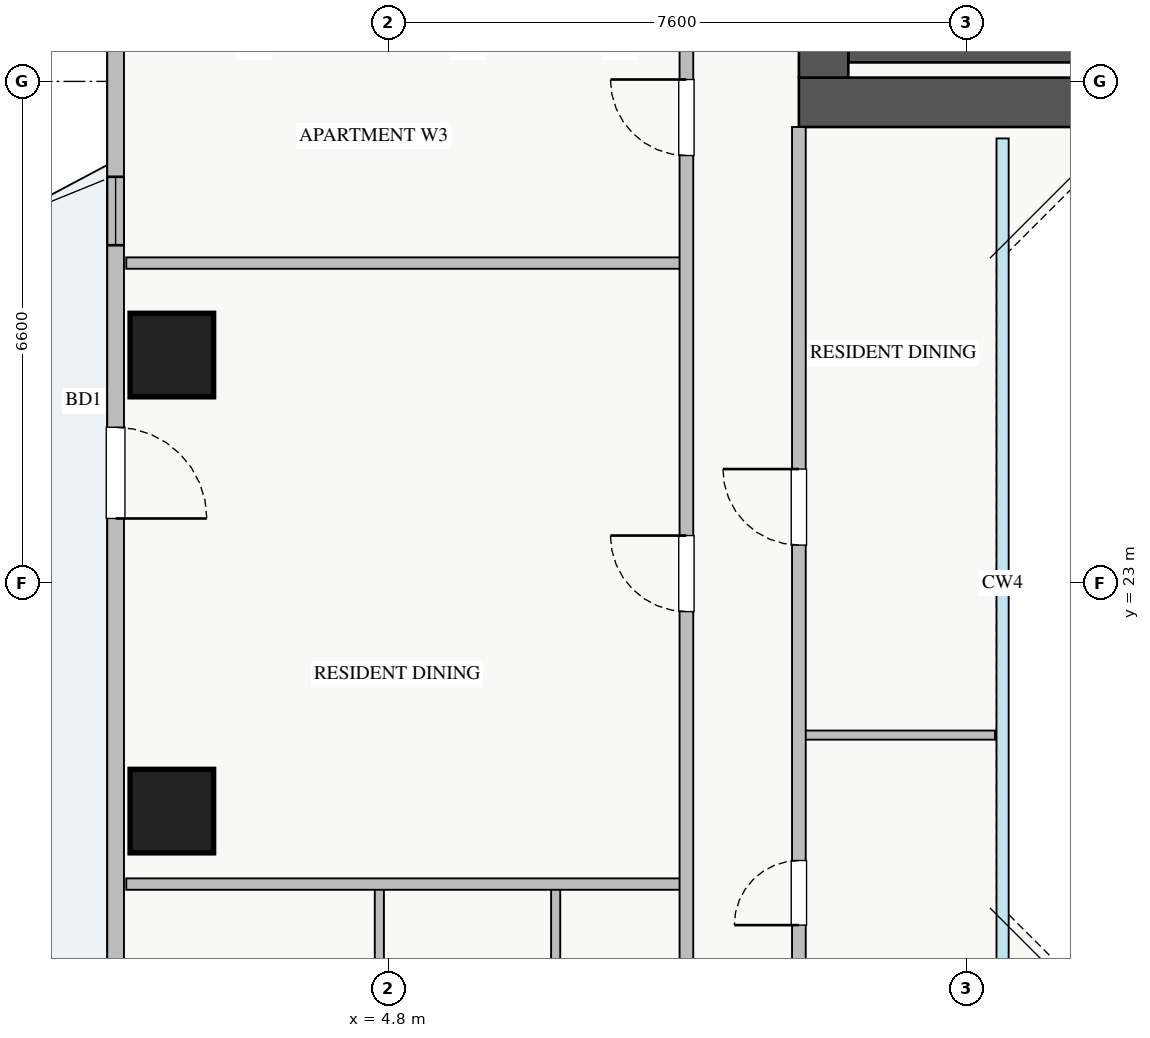
"""IFC4 building model, lengths in metres.
Left out: names, types, materials, properties, quantities, classifications, styles, units other than length and angle.
Written with IfcOpenShell. Run it as: python <this file> out.ifc"""

import sys

from ifc_helpers import new_model, si_unit, direction, frame, frame_2d, origin, origin_2d, place, context, subcontext, project, spatial, rectangle, extrude, source, transform, mapped, element, fill, save


model = new_model("IFC4")
c1 = context("Model", 3, precision=1e-05, world=origin(), true_north=direction((0.0, 1.0)))
c2 = subcontext(c1, "Body", "Model", "MODEL_VIEW")
j1 = project(units=[si_unit("LENGTHUNIT", "METRE"), si_unit("PLANEANGLEUNIT", "RADIAN")], contexts=[c1])
p1 = place(None, origin())
s1 = spatial("IfcSite", under=j1, at=p1, CompositionType="ELEMENT")
p2 = place(p1, origin())
s2 = spatial("IfcBuilding", under=s1, at=p2, CompositionType="ELEMENT")
p3 = place(p2, frame((0.0, 0.0, 123.0)))
s3 = spatial("IfcBuildingStorey", under=s2, at=p3, CompositionType="ELEMENT", Elevation=123.0)
p4 = place(p3, frame((10.85, 29.95, 0.0), z_axis=(0.0, 0.0, 1.0), x_axis=(1.0, 0.0, 0.0)))
e1 = element("IfcWall", 1, at=p4, inside=s3, PredefinedType="SHEAR", context=c2, shape_type="SweptSolid", body=[
    extrude(rectangle(XDim=7.3, YDim=0.2, at=frame_2d((3.65, 0.0))), origin(), (0.0, 0.0, 1.0), 3.25),
])
p5 = place(p3, frame((10.2, 29.325, 0.0), z_axis=(0.0, 0.0, 1.0), x_axis=(1.0, 0.0, 0.0)))
e2 = element("IfcWall", 2, at=p5, inside=s3, PredefinedType="SHEAR", context=c2, shape_type="SweptSolid", body=[
    extrude(rectangle(XDim=17.6, YDim=0.65, at=frame_2d((8.8, 0.0))), origin(), (0.0, 0.0, 1.0), 3.25),
])
p6 = place(p3, frame((10.525, 29.65, 0.0), z_axis=(0.0, 0.0, 1.0), x_axis=(0.0, 1.0, 0.0)))
e3 = element("IfcWall", 3, at=p6, inside=s3, PredefinedType="SHEAR", context=c2, shape_type="SweptSolid", body=[
    extrude(rectangle(XDim=5.9, YDim=0.65, at=frame_2d((2.95, 0.0))), origin(), (0.0, 0.0, 1.0), 3.25),
])
m1 = source(origin(), c2, "Body", "SweptSolid", [
    extrude(rectangle(XDim=1.1, YDim=1.1, at=origin_2d()), origin(), (0.0, 0.0, 1.0), 3.25),
])
for number, where, z_axis, x_axis in (
    (4, (1.95, 26.0, 0.0), (0.0, 0.0, 1.0), (1.0, 0.0, 0.0)),
    (5, (1.95, 20.0, 0.0), (0.0, 0.0, 1.0), (1.0, 0.0, 0.0)),
):
    element("IfcColumn", number, at=place(p3, frame(where, z_axis=z_axis, x_axis=x_axis)), inside=s3, PredefinedType="COLUMN", context=c2, shape_type="MappedRepresentation", body=[
        mapped(m1, transform((0.0, 0.0, 0.0), x_axis=(1.0, 0.0, 0.0), y_axis=(0.0, 1.0, 0.0), z_axis=(0.0, 0.0, 1.0), scale=1.0)),
    ])
p7 = place(p3, frame((1.21, 10.55, 0.0), z_axis=(0.0, 0.0, 1.0), x_axis=(0.0, 1.0, 0.0)))
e6 = element("IfcWall", 6, at=p7, inside=s3, PredefinedType="STANDARD", context=c2, shape_type="SweptSolid", body=[
    extrude(rectangle(XDim=24.9, YDim=0.22, at=frame_2d((12.45, 0.0))), origin(), (0.0, 0.0, 1.0), 2.61),
])
p8 = place(p7, frame((13.3, 0.0, 0.0)))
e7 = element("IfcOpeningElement", 7, at=p8, cuts=e6, PredefinedType="OPENING", context=c2, shape_type="SweptSolid", body=[
    extrude(rectangle(XDim=1.2, YDim=2.1, at=frame_2d((0.6, 1.05))), frame((0.0, 0.12, 0.0), z_axis=(0.0, -1.0, 0.0), x_axis=(1.0, 0.0, 0.0)), (0.0, 0.0, 1.0), 0.24),
])
p9 = place(p7, frame((0.625, 0.0, 0.9)))
e8 = element("IfcOpeningElement", 8, at=p9, cuts=e6, PredefinedType="OPENING", context=c2, shape_type="SweptSolid", body=[
    extrude(rectangle(XDim=2.4, YDim=1.5, at=frame_2d((1.2, 0.75))), frame((0.0, 0.12, 0.0), z_axis=(0.0, -1.0, 0.0), x_axis=(1.0, 0.0, 0.0)), (0.0, 0.0, 1.0), 0.24),
])
p10 = place(p7, frame((21.82, 0.0, 0.9)))
e9 = element("IfcOpeningElement", 9, at=p10, cuts=e6, PredefinedType="OPENING", context=c2, shape_type="SweptSolid", body=[
    extrude(rectangle(XDim=2.1, YDim=1.5, at=frame_2d((1.05, 0.75))), frame((0.0, 0.12, 0.0), z_axis=(0.0, -1.0, 0.0), x_axis=(1.0, 0.0, 0.0)), (0.0, 0.0, 1.0), 0.24),
])
p11 = place(p7, frame((4.847, 0.0, 0.9)))
e10 = element("IfcOpeningElement", 10, at=p11, cuts=e6, PredefinedType="OPENING", context=c2, shape_type="SweptSolid", body=[
    extrude(rectangle(XDim=2.4, YDim=1.5, at=frame_2d((1.2, 0.75))), frame((0.0, 0.12, 0.0), z_axis=(0.0, -1.0, 0.0), x_axis=(1.0, 0.0, 0.0)), (0.0, 0.0, 1.0), 0.24),
])
p12 = place(p7, frame((16.895, 0.0, 0.9)))
e11 = element("IfcOpeningElement", 11, at=p12, cuts=e6, PredefinedType="OPENING", context=c2, shape_type="SweptSolid", body=[
    extrude(rectangle(XDim=0.9, YDim=1.2, at=frame_2d((0.45, 0.6))), frame((0.0, 0.12, 0.0), z_axis=(0.0, -1.0, 0.0), x_axis=(1.0, 0.0, 0.0)), (0.0, 0.0, 1.0), 0.24),
])
for number, where, z_axis, x_axis in (
    (12, (4.68, 14.17, 0.0), (0.0, 0.0, 1.0), (0.0, 1.0, 0.0)),
    (13, (7.0, 14.17, 0.0), (0.0, 0.0, 1.0), (0.0, 1.0, 0.0)),
):
    element("IfcWall", number, at=place(p3, frame(where, z_axis=z_axis, x_axis=x_axis)), inside=s3, PredefinedType="PLUMBINGWALL", context=c2, shape_type="SweptSolid", body=[
        extrude(rectangle(XDim=4.87, YDim=0.12, at=frame_2d((2.435, 0.0))), origin(), (0.0, 0.0, 1.0), 3.07),
    ])
for number, where, z_axis, x_axis in (
    (14, (1.35, 19.04, 0.0), (0.0, 0.0, 1.0), (1.0, 0.0, 0.0)),
    (15, (1.35, 27.21, 0.0), (0.0, 0.0, 1.0), (1.0, 0.0, 0.0)),
):
    element("IfcWall", number, at=place(p3, frame(where, z_axis=z_axis, x_axis=x_axis)), inside=s3, PredefinedType="PARTITIONING", context=c2, shape_type="SweptSolid", body=[
        extrude(rectangle(XDim=7.37, YDim=0.15, at=frame_2d((3.685, 0.0))), origin(), (0.0, 0.0, 1.0), 3.07),
    ])
p13 = place(p3, frame((8.72, 8.31, 0.0), z_axis=(0.0, 0.0, 1.0), x_axis=(0.0, 1.0, 0.0)))
e16 = element("IfcWall", 16, at=p13, inside=s3, PredefinedType="PARTITIONING", context=c2, shape_type="SweptSolid", body=[
    extrude(rectangle(XDim=29.37, YDim=0.18, at=frame_2d((14.685, 0.0))), origin(), (0.0, 0.0, 1.0), 3.07),
])
p14 = place(p13, frame((28.06, 0.0, 0.0)))
e17 = element("IfcOpeningElement", 17, at=p14, cuts=e16, PredefinedType="OPENING", context=c2, shape_type="SweptSolid", body=[
    extrude(rectangle(XDim=0.9, YDim=2.05, at=frame_2d((0.45, 1.025))), frame((0.0, 0.1, 0.0), z_axis=(0.0, -1.0, 0.0), x_axis=(1.0, 0.0, 0.0)), (0.0, 0.0, 1.0), 0.2),
])
p15 = place(p13, frame((0.24, 0.0, 0.0)))
e18 = element("IfcOpeningElement", 18, at=p15, cuts=e16, PredefinedType="OPENING", context=c2, shape_type="SweptSolid", body=[
    extrude(rectangle(XDim=0.9, YDim=2.05, at=frame_2d((0.45, 1.025))), frame((0.0, 0.1, 0.0), z_axis=(0.0, -1.0, 0.0), x_axis=(1.0, 0.0, 0.0)), (0.0, 0.0, 1.0), 0.2),
])
p16 = place(p13, frame((2.92, 0.0, 0.0)))
e19 = element("IfcOpeningElement", 19, at=p16, cuts=e16, PredefinedType="OPENING", context=c2, shape_type="SweptSolid", body=[
    extrude(rectangle(XDim=1.0, YDim=2.05, at=frame_2d((0.5, 1.025))), frame((0.0, 0.1, 0.0), z_axis=(0.0, -1.0, 0.0), x_axis=(1.0, 0.0, 0.0)), (0.0, 0.0, 1.0), 0.2),
])
p17 = place(p13, frame((14.315, 0.0, 0.0)))
e20 = element("IfcOpeningElement", 20, at=p17, cuts=e16, PredefinedType="OPENING", context=c2, shape_type="SweptSolid", body=[
    extrude(rectangle(XDim=1.0, YDim=2.05, at=frame_2d((0.5, 1.025))), frame((0.0, 0.1, 0.0), z_axis=(0.0, -1.0, 0.0), x_axis=(1.0, 0.0, 0.0)), (0.0, 0.0, 1.0), 0.2),
])
p18 = place(p13, frame((20.315, 0.0, 0.0)))
e21 = element("IfcOpeningElement", 21, at=p18, cuts=e16, PredefinedType="OPENING", context=c2, shape_type="SweptSolid", body=[
    extrude(rectangle(XDim=1.0, YDim=2.05, at=frame_2d((0.5, 1.025))), frame((0.0, 0.1, 0.0), z_axis=(0.0, -1.0, 0.0), x_axis=(1.0, 0.0, 0.0)), (0.0, 0.0, 1.0), 0.2),
])
p19 = place(p3, frame((10.2, 21.0, 0.0), z_axis=(0.0, 0.0, 1.0), x_axis=(1.0, 0.0, 0.0)))
e22 = element("IfcWall", 22, at=p19, inside=s3, PredefinedType="PLUMBINGWALL", context=c2, shape_type="SweptSolid", body=[
    extrude(rectangle(XDim=2.58, YDim=0.12, at=frame_2d((1.29, 0.0))), origin(), (0.0, 0.0, 1.0), 3.07),
])
p20 = place(p3, frame((10.2, 17.0, 0.0), z_axis=(0.0, 0.0, 1.0), x_axis=(0.0, 1.0, 0.0)))
e23 = element("IfcWall", 23, at=p20, inside=s3, PredefinedType="PARTITIONING", context=c2, shape_type="SweptSolid", body=[
    extrude(rectangle(XDim=12.0, YDim=0.18, at=frame_2d((6.0, 0.0))), origin(), (0.0, 0.0, 1.0), 3.07),
])
p21 = place(p20, frame((1.5, 0.0, 0.0)))
e24 = element("IfcOpeningElement", 24, at=p21, cuts=e23, PredefinedType="OPENING", context=c2, shape_type="SweptSolid", body=[
    extrude(rectangle(XDim=0.85, YDim=2.05, at=frame_2d((0.425, 1.025))), frame((0.0, 0.1, 0.0), z_axis=(0.0, -1.0, 0.0), x_axis=(1.0, 0.0, 0.0)), (0.0, 0.0, 1.0), 0.2),
])
p22 = place(p20, frame((6.5, 0.0, 0.0)))
e25 = element("IfcOpeningElement", 25, at=p22, cuts=e23, PredefinedType="OPENING", context=c2, shape_type="SweptSolid", body=[
    extrude(rectangle(XDim=1.0, YDim=2.05, at=frame_2d((0.5, 1.025))), frame((0.0, 0.1, 0.0), z_axis=(0.0, -1.0, 0.0), x_axis=(1.0, 0.0, 0.0)), (0.0, 0.0, 1.0), 0.2),
])
m2 = source(origin(), c2, "Body", "SweptSolid", [
    extrude(rectangle(XDim=1.2, YDim=2.1, at=frame_2d((0.6, 1.05))), frame((0.0, 0.025, 0.0), z_axis=(0.0, -1.0, 0.0), x_axis=(1.0, 0.0, 0.0)), (0.0, 0.0, 1.0), 0.05),
])
p23 = place(p8, frame((1.2, 0.0, 0.0), z_axis=(0.0, 0.0, 1.0), x_axis=(-1.0, 0.0, 0.0)))
e26 = element("IfcDoor", 26, at=p23, inside=s3, OperationType="SINGLE_SWING_LEFT", PredefinedType="DOOR", context=c2, shape_type="MappedRepresentation", body=[
    mapped(m2, transform((0.0, 0.0, 0.0), x_axis=(1.0, 0.0, 0.0), y_axis=(0.0, 1.0, 0.0), z_axis=(0.0, 0.0, 1.0), scale=1.0)),
])
fill(e7, e26)
m3 = source(origin(), c2, "Body", "SweptSolid", [
    extrude(rectangle(XDim=1.0, YDim=2.05, at=frame_2d((0.5, 1.025))), frame((0.0, 0.025, 0.0), z_axis=(0.0, -1.0, 0.0), x_axis=(1.0, 0.0, 0.0)), (0.0, 0.0, 1.0), 0.05),
])
p24 = place(p17, origin())
e27 = element("IfcDoor", 27, at=p24, inside=s3, OperationType="SINGLE_SWING_RIGHT", PredefinedType="DOOR", context=c2, shape_type="MappedRepresentation", body=[
    mapped(m3, transform((0.0, 0.0, 0.0), x_axis=(1.0, 0.0, 0.0), y_axis=(0.0, 1.0, 0.0), z_axis=(0.0, 0.0, 1.0), scale=1.0)),
])
fill(e20, e27)
p25 = place(p18, origin())
e28 = element("IfcDoor", 28, at=p25, inside=s3, OperationType="SINGLE_SWING_RIGHT", PredefinedType="DOOR", context=c2, shape_type="MappedRepresentation", body=[
    mapped(m3, transform((0.0, 0.0, 0.0), x_axis=(1.0, 0.0, 0.0), y_axis=(0.0, 1.0, 0.0), z_axis=(0.0, 0.0, 1.0), scale=1.0)),
])
fill(e21, e28)
m4 = source(origin(), c2, "Body", "SweptSolid", [
    extrude(rectangle(XDim=0.85, YDim=2.05, at=frame_2d((0.425, 1.025))), frame((0.0, 0.025, 0.0), z_axis=(0.0, -1.0, 0.0), x_axis=(1.0, 0.0, 0.0)), (0.0, 0.0, 1.0), 0.05),
])
p26 = place(p21, origin())
e29 = element("IfcDoor", 29, at=p26, inside=s3, OperationType="SINGLE_SWING_LEFT", PredefinedType="DOOR", context=c2, shape_type="MappedRepresentation", body=[
    mapped(m4, transform((0.0, 0.0, 0.0), x_axis=(1.0, 0.0, 0.0), y_axis=(0.0, 1.0, 0.0), z_axis=(0.0, 0.0, 1.0), scale=1.0)),
])
fill(e24, e29)
p27 = place(p22, origin())
e30 = element("IfcDoor", 30, at=p27, inside=s3, OperationType="SINGLE_SWING_RIGHT", PredefinedType="DOOR", context=c2, shape_type="MappedRepresentation", body=[
    mapped(m3, transform((0.0, 0.0, 0.0), x_axis=(1.0, 0.0, 0.0), y_axis=(0.0, 1.0, 0.0), z_axis=(0.0, 0.0, 1.0), scale=1.0)),
])
fill(e25, e30)
m5 = source(origin(), c2, "Body", "SweptSolid", [
    extrude(rectangle(XDim=0.9, YDim=1.2, at=frame_2d((0.45, 0.6))), frame((0.0, 0.03, 0.0), z_axis=(0.0, -1.0, 0.0), x_axis=(1.0, 0.0, 0.0)), (0.0, 0.0, 1.0), 0.06),
])
p28 = place(p12, origin())
e31 = element("IfcWindow", 31, at=p28, inside=s3, PartitioningType="SINGLE_PANEL", PredefinedType="WINDOW", context=c2, shape_type="MappedRepresentation", body=[
    mapped(m5, transform((0.0, 0.0, 0.0), x_axis=(1.0, 0.0, 0.0), y_axis=(0.0, 1.0, 0.0), z_axis=(0.0, 0.0, 1.0), scale=1.0)),
])
fill(e11, e31)
save(model, sys.argv[1])
